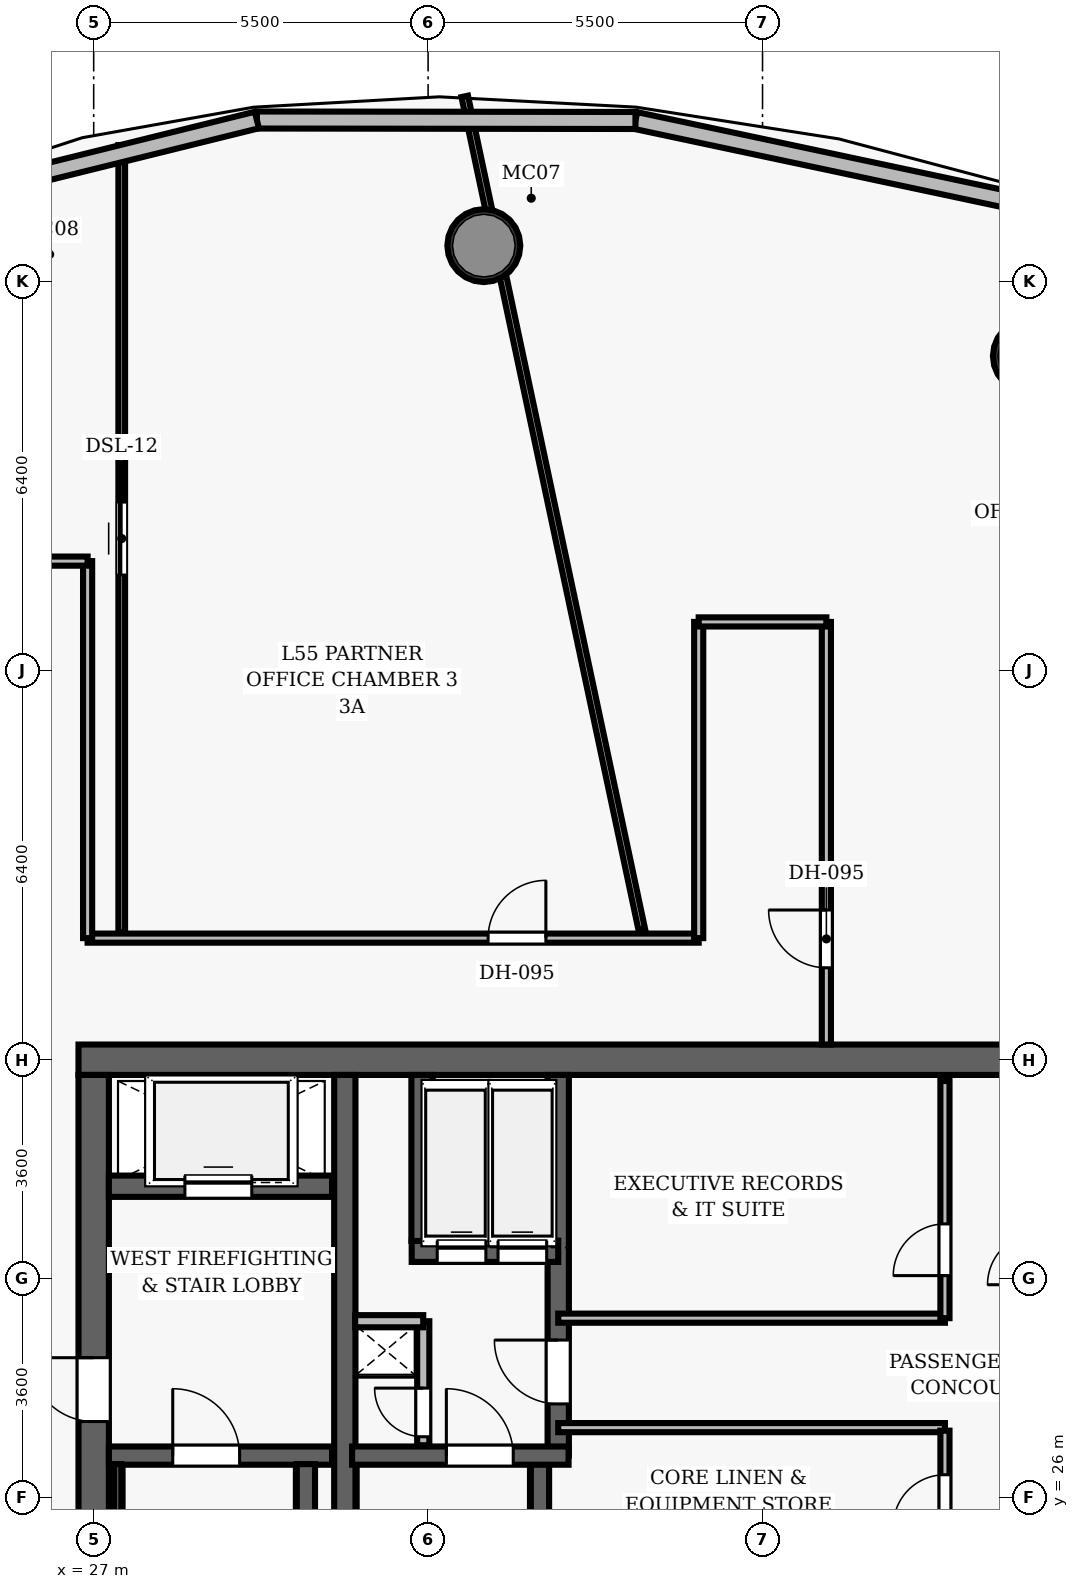
"""IFC4 building model, lengths in metres.
Left out: names, types, materials, properties, quantities, classifications, styles, units other than length and angle.
Written with IfcOpenShell. Run it as: python <this file> out.ifc"""

import sys

from ifc_helpers import new_model, si_unit, direction, frame, frame_2d, origin, origin_2d, place, context, subcontext, project, spatial, rectangle, hollow_circle, extrude, element, fill, save


model = new_model("IFC4")
c1 = context("Model", 3, precision=1e-05, world=origin(), true_north=direction((0.0, 1.0)))
c2 = subcontext(c1, "Body", "Model", "MODEL_VIEW")
j1 = project(units=[si_unit("LENGTHUNIT", "METRE"), si_unit("PLANEANGLEUNIT", "RADIAN")], contexts=[c1])
p1 = place(None, origin())
s1 = spatial("IfcSite", under=j1, at=p1, CompositionType="ELEMENT")
p2 = place(p1, origin())
s2 = spatial("IfcBuilding", under=s1, at=p2, CompositionType="ELEMENT")
p3 = place(p2, frame((0.0, 0.0, 217.4)))
s3 = spatial("IfcBuildingStorey", under=s2, at=p3, CompositionType="ELEMENT", Elevation=217.4)
p4 = place(p3, frame((26.75, 33.2, 0.0), z_axis=(0.0, 0.0, 1.0), x_axis=(1.0, 0.0, 0.0)))
e1 = element("IfcWall", 1, at=p4, inside=s3, PredefinedType="SHEAR", context=c2, shape_type="SweptSolid", body=[
    extrude(rectangle(XDim=22.5, YDim=0.5, at=frame_2d((11.25, 0.0))), origin(), (0.0, 0.0, 1.0), 3.85),
])
p5 = place(p3, frame((27.0, 19.05, 0.0), z_axis=(0.0, 0.0, 1.0), x_axis=(0.0, 1.0, 0.0)))
e2 = element("IfcWall", 2, at=p5, inside=s3, PredefinedType="SHEAR", context=c2, shape_type="SweptSolid", body=[
    extrude(rectangle(XDim=13.9, YDim=0.5, at=frame_2d((6.95, 0.0))), origin(), (0.0, 0.0, 1.0), 3.85),
])
p6 = place(p5, frame((8.2, 0.0, 0.0)))
e3 = element("IfcOpeningElement", 3, at=p6, cuts=e2, PredefinedType="OPENING", context=c2, shape_type="SweptSolid", body=[
    extrude(rectangle(XDim=1.05, YDim=2.15, at=frame_2d((0.525, 1.075))), frame((0.0, 0.26, 0.0), z_axis=(0.0, -1.0, 0.0), x_axis=(1.0, 0.0, 0.0)), (0.0, 0.0, 1.0), 0.52),
])
p7 = place(p3, frame((31.13, 19.05, 0.0), z_axis=(0.0, 0.0, 1.0), x_axis=(0.0, 1.0, 0.0)))
e4 = element("IfcWall", 4, at=p7, inside=s3, PredefinedType="SHEAR", context=c2, shape_type="SweptSolid", body=[
    extrude(rectangle(XDim=13.9, YDim=0.35, at=frame_2d((6.95, 0.0))), origin(), (0.0, 0.0, 1.0), 3.85),
])
for number, where, z_axis, x_axis in (
    (5, (42.389, 44.772, 0.0), (0.0, 0.0, 1.0), (1.0, 0.0, 0.0)),
    (6, (33.416, 46.588, 0.0), (0.0, 0.0, 1.0), (1.0, 0.0, 0.0)),
):
    element("IfcColumn", number, at=place(p3, frame(where, z_axis=z_axis, x_axis=x_axis)), inside=s3, PredefinedType="COLUMN", context=c2, shape_type="SweptSolid", body=[
        extrude(hollow_circle(Radius=0.6, WallThickness=0.05, at=origin_2d()), origin(), (0.0, 0.0, 1.0), 3.85),
    ])
p8 = place(p3, frame((27.25, 26.69, 0.0), z_axis=(0.0, 0.0, 1.0), x_axis=(1.0, 0.0, 0.0)))
e7 = element("IfcWall", 7, at=p8, inside=s3, PredefinedType="SHEAR", context=c2, shape_type="SweptSolid", body=[
    extrude(rectangle(XDim=3.67, YDim=0.3, at=frame_2d((1.835, 0.0))), origin(), (0.0, 0.0, 1.0), 3.85),
])
p9 = place(p8, frame((1.05, 0.0, 0.0)))
e8 = element("IfcOpeningElement", 8, at=p9, cuts=e7, PredefinedType="OPENING", context=c2, shape_type="SweptSolid", body=[
    extrude(rectangle(XDim=1.1, YDim=2.15, at=frame_2d((0.55, 1.075))), frame((0.0, 0.16, 0.0), z_axis=(0.0, -1.0, 0.0), x_axis=(1.0, 0.0, 0.0)), (0.0, 0.0, 1.0), 0.32),
])
p10 = place(p3, frame((30.49, 19.05, 0.0), z_axis=(0.0, 0.0, 1.0), x_axis=(0.0, 1.0, 0.0)))
e9 = element("IfcWall", 9, at=p10, inside=s3, PredefinedType="SHEAR", context=c2, shape_type="SweptSolid", body=[
    extrude(rectangle(XDim=7.5, YDim=0.3, at=frame_2d((3.75, 0.0))), origin(), (0.0, 0.0, 1.0), 3.85),
])
p11 = place(p3, frame((27.395, 19.1, 0.0), z_axis=(0.0, 0.0, 1.0), x_axis=(0.0, 1.0, 0.0)))
e10 = element("IfcWall", 10, at=p11, inside=s3, PredefinedType="SHEAR", context=c2, shape_type="SweptSolid", body=[
    extrude(rectangle(XDim=7.45, YDim=0.12, at=frame_2d((3.725, 0.0))), origin(), (0.0, 0.0, 1.0), 3.85),
])
p12 = place(p3, frame((27.25, 31.12, 0.0), z_axis=(0.0, 0.0, 1.0), x_axis=(1.0, 0.0, 0.0)))
e11 = element("IfcWall", 11, at=p12, inside=s3, PredefinedType="SHEAR", context=c2, shape_type="SweptSolid", body=[
    extrude(rectangle(XDim=3.67, YDim=0.35, at=frame_2d((1.835, 0.0))), origin(), (0.0, 0.0, 1.0), 3.035),
])
p13 = place(p12, frame((1.25, 0.0, 0.0)))
e12 = element("IfcOpeningElement", 12, at=p13, cuts=e11, PredefinedType="OPENING", context=c2, shape_type="SweptSolid", body=[
    extrude(rectangle(XDim=1.1, YDim=2.15, at=frame_2d((0.55, 1.075))), frame((0.0, 0.185, 0.0), z_axis=(0.0, -1.0, 0.0), x_axis=(1.0, 0.0, 0.0)), (0.0, 0.0, 1.0), 0.37),
])
p14 = place(p3, frame((34.34, 19.05, 0.0), z_axis=(0.0, 0.0, 1.0), x_axis=(0.0, 1.0, 0.0)))
e13 = element("IfcWall", 13, at=p14, inside=s3, PredefinedType="SHEAR", context=c2, shape_type="SweptSolid", body=[
    extrude(rectangle(XDim=7.5, YDim=0.3, at=frame_2d((3.75, 0.0))), origin(), (0.0, 0.0, 1.0), 3.85),
])
p15 = place(p3, frame((34.64, 26.69, 0.0), z_axis=(0.0, 0.0, 1.0), x_axis=(0.0, 1.0, 0.0)))
e14 = element("IfcWall", 14, at=p15, inside=s3, PredefinedType="SHEAR", context=c2, shape_type="SweptSolid", body=[
    extrude(rectangle(XDim=6.26, YDim=0.35, at=frame_2d((3.13, 0.0))), origin(), (0.0, 0.0, 1.0), 3.85),
])
p16 = place(p15, frame((0.85, 0.0, 0.0)))
e15 = element("IfcOpeningElement", 15, at=p16, cuts=e14, PredefinedType="OPENING", context=c2, shape_type="SweptSolid", body=[
    extrude(rectangle(XDim=1.05, YDim=2.15, at=frame_2d((0.525, 1.075))), frame((0.0, 0.185, 0.0), z_axis=(0.0, -1.0, 0.0), x_axis=(1.0, 0.0, 0.0)), (0.0, 0.0, 1.0), 0.37),
])
p17 = place(p3, frame((31.25, 26.69, 0.0), z_axis=(0.0, 0.0, 1.0), x_axis=(1.0, 0.0, 0.0)))
e16 = element("IfcWall", 16, at=p17, inside=s3, PredefinedType="SHEAR", context=c2, shape_type="SweptSolid", body=[
    extrude(rectangle(XDim=3.56, YDim=0.3, at=frame_2d((1.78, 0.0))), origin(), (0.0, 0.0, 1.0), 3.85),
])
p18 = place(p17, frame((1.55, 0.0, 0.0)))
e17 = element("IfcOpeningElement", 17, at=p18, cuts=e16, PredefinedType="OPENING", context=c2, shape_type="SweptSolid", body=[
    extrude(rectangle(XDim=1.1, YDim=2.15, at=frame_2d((0.55, 1.075))), frame((0.0, 0.16, 0.0), z_axis=(0.0, -1.0, 0.0), x_axis=(1.0, 0.0, 0.0)), (0.0, 0.0, 1.0), 0.32),
])
p19 = place(p3, frame((32.23, 30.05, 0.0), z_axis=(0.0, 0.0, 1.0), x_axis=(1.0, 0.0, 0.0)))
e18 = element("IfcWall", 18, at=p19, inside=s3, PredefinedType="SHEAR", context=c2, shape_type="SweptSolid", body=[
    extrude(rectangle(XDim=2.41, YDim=0.35, at=frame_2d((1.205, 0.0))), origin(), (0.0, 0.0, 1.0), 3.035),
])
p20 = place(p19, frame((0.42, 0.0, 0.0)))
e19 = element("IfcOpeningElement", 19, at=p20, cuts=e18, PredefinedType="OPENING", context=c2, shape_type="SweptSolid", body=[
    extrude(rectangle(XDim=0.8, YDim=2.15, at=frame_2d((0.4, 1.075))), frame((0.0, 0.185, 0.0), z_axis=(0.0, -1.0, 0.0), x_axis=(1.0, 0.0, 0.0)), (0.0, 0.0, 1.0), 0.37),
])
p21 = place(p19, frame((1.42, 0.0, 0.0)))
e20 = element("IfcOpeningElement", 20, at=p21, cuts=e18, PredefinedType="OPENING", context=c2, shape_type="SweptSolid", body=[
    extrude(rectangle(XDim=0.8, YDim=2.15, at=frame_2d((0.4, 1.075))), frame((0.0, 0.185, 0.0), z_axis=(0.0, -1.0, 0.0), x_axis=(1.0, 0.0, 0.0)), (0.0, 0.0, 1.0), 0.37),
])
p22 = place(p3, frame((32.4, 30.22, 0.0), z_axis=(0.0, 0.0, 1.0), x_axis=(0.0, 1.0, 0.0)))
e21 = element("IfcWall", 21, at=p22, inside=s3, PredefinedType="SHEAR", context=c2, shape_type="SweptSolid", body=[
    extrude(rectangle(XDim=2.73, YDim=0.35, at=frame_2d((1.365, 0.0))), origin(), (0.0, 0.0, 1.0), 3.035),
])
p23 = place(p3, frame((32.42, 26.86, 0.0), z_axis=(0.0, 0.0, 1.0), x_axis=(0.0, 1.0, 0.0)))
e22 = element("IfcWall", 22, at=p23, inside=s3, PredefinedType="PARTITIONING", context=c2, shape_type="SweptSolid", body=[
    extrude(rectangle(XDim=2.04, YDim=0.2, at=frame_2d((1.02, 0.0))), origin(), (0.0, 0.0, 1.0), 3.035),
])
p24 = place(p23, frame((0.14, 0.0, 0.0)))
e23 = element("IfcOpeningElement", 23, at=p24, cuts=e22, PredefinedType="OPENING", context=c2, shape_type="SweptSolid", body=[
    extrude(rectangle(XDim=0.8, YDim=2.05, at=frame_2d((0.4, 1.025))), frame((0.0, 0.11, 0.0), z_axis=(0.0, -1.0, 0.0), x_axis=(1.0, 0.0, 0.0)), (0.0, 0.0, 1.0), 0.22),
])
p25 = place(p3, frame((31.3, 28.9, 0.0), z_axis=(0.0, 0.0, 1.0), x_axis=(1.0, 0.0, 0.0)))
e24 = element("IfcWall", 24, at=p25, inside=s3, PredefinedType="PARTITIONING", context=c2, shape_type="SweptSolid", body=[
    extrude(rectangle(XDim=1.12, YDim=0.2, at=frame_2d((0.56, 0.0))), origin(), (0.0, 0.0, 1.0), 3.035),
])
for number, where, z_axis, x_axis in (
    (25, (34.64, 27.15, 0.0), (0.0, 0.0, 1.0), (1.0, 0.0, 0.0)),
    (26, (34.64, 28.95, 0.0), (0.0, 0.0, 1.0), (1.0, 0.0, 0.0)),
):
    element("IfcWall", number, at=place(p3, frame(where, z_axis=z_axis, x_axis=x_axis)), inside=s3, PredefinedType="PARTITIONING", context=c2, shape_type="SweptSolid", body=[
        extrude(rectangle(XDim=6.36, YDim=0.15, at=frame_2d((3.18, 0.0))), origin(), (0.0, 0.0, 1.0), 3.035),
    ])
p26 = place(p3, frame((41.0, 28.95, 0.0), z_axis=(0.0, 0.0, 1.0), x_axis=(0.0, 1.0, 0.0)))
e27 = element("IfcWall", 27, at=p26, inside=s3, PredefinedType="PARTITIONING", context=c2, shape_type="SweptSolid", body=[
    extrude(rectangle(XDim=3.9, YDim=0.15, at=frame_2d((1.95, 0.0))), origin(), (0.0, 0.0, 1.0), 3.035),
])
p27 = place(p26, frame((0.7, 0.0, 0.0)))
e28 = element("IfcOpeningElement", 28, at=p27, cuts=e27, PredefinedType="OPENING", context=c2, shape_type="SweptSolid", body=[
    extrude(rectangle(XDim=0.85, YDim=2.1, at=frame_2d((0.425, 1.05))), frame((0.0, 0.085, 0.0), z_axis=(0.0, -1.0, 0.0), x_axis=(1.0, 0.0, 0.0)), (0.0, 0.0, 1.0), 0.17),
])
p28 = place(p3, frame((41.0, 23.05, 0.0), z_axis=(0.0, 0.0, 1.0), x_axis=(0.0, 1.0, 0.0)))
e29 = element("IfcWall", 29, at=p28, inside=s3, PredefinedType="PARTITIONING", context=c2, shape_type="SweptSolid", body=[
    extrude(rectangle(XDim=4.05, YDim=0.15, at=frame_2d((2.025, 0.0))), origin(), (0.0, 0.0, 1.0), 3.035),
])
p29 = place(p28, frame((2.475, 0.0, 0.0)))
e30 = element("IfcOpeningElement", 30, at=p29, cuts=e29, PredefinedType="OPENING", context=c2, shape_type="SweptSolid", body=[
    extrude(rectangle(XDim=0.85, YDim=2.1, at=frame_2d((0.425, 1.05))), frame((0.0, 0.085, 0.0), z_axis=(0.0, -1.0, 0.0), x_axis=(1.0, 0.0, 0.0)), (0.0, 0.0, 1.0), 0.17),
])
p30 = place(p28, frame((0.45, 0.0, 0.0)))
e31 = element("IfcOpeningElement", 31, at=p30, cuts=e29, PredefinedType="OPENING", context=c2, shape_type="SweptSolid", body=[
    extrude(rectangle(XDim=0.85, YDim=2.1, at=frame_2d((0.425, 1.05))), frame((0.0, 0.085, 0.0), z_axis=(0.0, -1.0, 0.0), x_axis=(1.0, 0.0, 0.0)), (0.0, 0.0, 1.0), 0.17),
])
p31 = place(p3, frame((26.9, 35.2, 0.0), z_axis=(0.0, 0.0, 1.0), x_axis=(1.0, 0.0, 0.0)))
e32 = element("IfcWall", 32, at=p31, inside=s3, PredefinedType="PARTITIONING", context=c2, shape_type="SweptSolid", body=[
    extrude(rectangle(XDim=10.05, YDim=0.15, at=frame_2d((5.025, 0.0))), origin(), (0.0, 0.0, 1.0), 3.035),
])
p32 = place(p31, frame((6.587, 0.0, 0.0)))
e33 = element("IfcOpeningElement", 33, at=p32, cuts=e32, PredefinedType="OPENING", context=c2, shape_type="SweptSolid", body=[
    extrude(rectangle(XDim=0.95, YDim=2.15, at=frame_2d((0.475, 1.075))), frame((0.0, 0.085, 0.0), z_axis=(0.0, -1.0, 0.0), x_axis=(1.0, 0.0, 0.0)), (0.0, 0.0, 1.0), 0.17),
])
p33 = place(p3, frame((26.9, 35.2, 0.0), z_axis=(0.0, 0.0, 1.0), x_axis=(0.0, 1.0, 0.0)))
e34 = element("IfcWall", 34, at=p33, inside=s3, PredefinedType="PARTITIONING", context=c2, shape_type="SweptSolid", body=[
    extrude(rectangle(XDim=6.2, YDim=0.15, at=frame_2d((3.1, 0.0))), origin(), (0.0, 0.0, 1.0), 3.035),
])
p34 = place(p3, frame((24.8, 41.4, 0.0), z_axis=(0.0, 0.0, 1.0), x_axis=(1.0, 0.0, 0.0)))
e35 = element("IfcWall", 35, at=p34, inside=s3, PredefinedType="PARTITIONING", context=c2, shape_type="SweptSolid", body=[
    extrude(rectangle(XDim=2.1, YDim=0.15, at=frame_2d((1.05, 0.0))), origin(), (0.0, 0.0, 1.0), 3.035),
])
p35 = place(p3, frame((36.95, 35.2, 0.0), z_axis=(0.0, 0.0, 1.0), x_axis=(0.0, 1.0, 0.0)))
e36 = element("IfcWall", 36, at=p35, inside=s3, PredefinedType="PARTITIONING", context=c2, shape_type="SweptSolid", body=[
    extrude(rectangle(XDim=5.2, YDim=0.15, at=frame_2d((2.6, 0.0))), origin(), (0.0, 0.0, 1.0), 3.035),
])
p36 = place(p3, frame((39.05, 33.45, 0.0), z_axis=(0.0, 0.0, 1.0), x_axis=(0.0, 1.0, 0.0)))
e37 = element("IfcWall", 37, at=p36, inside=s3, PredefinedType="PARTITIONING", context=c2, shape_type="SweptSolid", body=[
    extrude(rectangle(XDim=6.95, YDim=0.15, at=frame_2d((3.475, 0.0))), origin(), (0.0, 0.0, 1.0), 3.035),
])
p37 = place(p36, frame((1.262, 0.0, 0.0)))
e38 = element("IfcOpeningElement", 38, at=p37, cuts=e37, PredefinedType="OPENING", context=c2, shape_type="SweptSolid", body=[
    extrude(rectangle(XDim=0.95, YDim=2.15, at=frame_2d((0.475, 1.075))), frame((0.0, 0.085, 0.0), z_axis=(0.0, -1.0, 0.0), x_axis=(1.0, 0.0, 0.0)), (0.0, 0.0, 1.0), 0.17),
])
p38 = place(p3, frame((36.95, 40.4, 0.0), z_axis=(0.0, 0.0, 1.0), x_axis=(1.0, 0.0, 0.0)))
e39 = element("IfcWall", 39, at=p38, inside=s3, PredefinedType="PARTITIONING", context=c2, shape_type="SweptSolid", body=[
    extrude(rectangle(XDim=2.1, YDim=0.15, at=frame_2d((1.05, 0.0))), origin(), (0.0, 0.0, 1.0), 3.035),
])
p39 = place(p3, frame((36.015, 35.34, 0.0), z_axis=(0.0, 0.0, 1.0), x_axis=(-0.207905443256, 0.978148928673, 0.0)))
e40 = element("IfcWall", 40, at=p39, inside=s3, PredefinedType="PARTITIONING", context=c2, shape_type="SweptSolid", body=[
    extrude(rectangle(XDim=14.009, YDim=0.11, at=frame_2d((7.005, 0.0))), origin(), (0.0, 0.0, 1.0), 3.035),
])
p40 = place(p3, frame((27.461, 35.3, 0.0), z_axis=(0.0, 0.0, 1.0), x_axis=(0.0, 1.0, 0.0)))
e41 = element("IfcWall", 41, at=p40, inside=s3, PredefinedType="PARTITIONING", context=c2, shape_type="SweptSolid", body=[
    extrude(rectangle(XDim=12.942, YDim=0.11, at=frame_2d((6.471, 0.0))), origin(), (0.0, 0.0, 1.0), 3.035),
])
p41 = place(p40, frame((5.871, 0.0, 0.0)))
e42 = element("IfcOpeningElement", 42, at=p41, cuts=e41, PredefinedType="OPENING", context=c2, shape_type="SweptSolid", body=[
    extrude(rectangle(XDim=1.2, YDim=2.15, at=frame_2d((0.6, 1.075))), frame((0.0, 0.065, 0.0), z_axis=(0.0, -1.0, 0.0), x_axis=(1.0, 0.0, 0.0)), (0.0, 0.0, 1.0), 0.13),
])
p42 = place(p3, frame((35.91, 48.646, 0.0), z_axis=(0.0, 0.0, 1.0), x_axis=(0.978160131295, -0.207852730423, 0.0)))
e43 = element("IfcWall", 43, at=p42, inside=s3, PredefinedType="SOLIDWALL", context=c2, shape_type="SweptSolid", body=[
    extrude(rectangle(XDim=6.784, YDim=0.28, at=frame_2d((3.392, 0.0))), origin(), (0.0, 0.0, 1.0), 3.62),
])
p43 = place(p3, frame((29.684, 48.654, 0.0), z_axis=(0.0, 0.0, 1.0), x_axis=(0.999999212858, -0.001254704157, 0.0)))
e44 = element("IfcWall", 44, at=p43, inside=s3, PredefinedType="SOLIDWALL", context=c2, shape_type="SweptSolid", body=[
    extrude(rectangle(XDim=6.227, YDim=0.28, at=frame_2d((3.113, 0.0))), origin(), (0.0, 0.0, 1.0), 3.62),
])
p44 = place(p3, frame((24.379, 47.342, 0.0), z_axis=(0.0, 0.0, 1.0), x_axis=(0.970725742069, 0.240190619476, 0.0)))
e45 = element("IfcWall", 45, at=p44, inside=s3, PredefinedType="SOLIDWALL", context=c2, shape_type="SweptSolid", body=[
    extrude(rectangle(XDim=5.464, YDim=0.28, at=frame_2d((2.732, 0.0))), origin(), (0.0, 0.0, 1.0), 3.62),
])
p45 = place(p9, origin())
e46 = element("IfcDoor", 46, at=p45, inside=s3, OperationType="SINGLE_SWING_LEFT", PredefinedType="DOOR", context=c2, shape_type="SweptSolid", body=[
    extrude(rectangle(XDim=1.1, YDim=2.15, at=frame_2d((0.55, 1.075))), frame((0.0, 0.025, 0.0), z_axis=(0.0, -1.0, 0.0), x_axis=(1.0, 0.0, 0.0)), (0.0, 0.0, 1.0), 0.05),
])
fill(e8, e46)
p46 = place(p6, origin())
e47 = element("IfcDoor", 47, at=p46, inside=s3, OperationType="SINGLE_SWING_RIGHT", PredefinedType="DOOR", context=c2, shape_type="SweptSolid", body=[
    extrude(rectangle(XDim=1.05, YDim=2.15, at=frame_2d((0.525, 1.075))), frame((0.0, 0.025, 0.0), z_axis=(0.0, -1.0, 0.0), x_axis=(1.0, 0.0, 0.0)), (0.0, 0.0, 1.0), 0.05),
])
fill(e3, e47)
p47 = place(p18, origin())
e48 = element("IfcDoor", 48, at=p47, inside=s3, OperationType="SINGLE_SWING_LEFT", PredefinedType="DOOR", context=c2, shape_type="SweptSolid", body=[
    extrude(rectangle(XDim=1.1, YDim=2.15, at=frame_2d((0.55, 1.075))), frame((0.0, 0.025, 0.0), z_axis=(0.0, -1.0, 0.0), x_axis=(1.0, 0.0, 0.0)), (0.0, 0.0, 1.0), 0.05),
])
fill(e17, e48)
p48 = place(p24, origin())
e49 = element("IfcDoor", 49, at=p48, inside=s3, OperationType="SINGLE_SWING_RIGHT", PredefinedType="DOOR", context=c2, shape_type="SweptSolid", body=[
    extrude(rectangle(XDim=0.8, YDim=2.05, at=frame_2d((0.4, 1.025))), frame((0.0, 0.025, 0.0), z_axis=(0.0, -1.0, 0.0), x_axis=(1.0, 0.0, 0.0)), (0.0, 0.0, 1.0), 0.05),
])
fill(e23, e49)
p49 = place(p16, origin())
e50 = element("IfcDoor", 50, at=p49, inside=s3, OperationType="SINGLE_SWING_RIGHT", PredefinedType="DOOR", context=c2, shape_type="SweptSolid", body=[
    extrude(rectangle(XDim=1.05, YDim=2.15, at=frame_2d((0.525, 1.075))), frame((0.0, 0.025, 0.0), z_axis=(0.0, -1.0, 0.0), x_axis=(1.0, 0.0, 0.0)), (0.0, 0.0, 1.0), 0.05),
])
fill(e15, e50)
p50 = place(p27, origin())
e51 = element("IfcDoor", 51, at=p50, inside=s3, OperationType="SINGLE_SWING_LEFT", PredefinedType="DOOR", context=c2, shape_type="SweptSolid", body=[
    extrude(rectangle(XDim=0.85, YDim=2.1, at=frame_2d((0.425, 1.05))), frame((0.0, 0.025, 0.0), z_axis=(0.0, -1.0, 0.0), x_axis=(1.0, 0.0, 0.0)), (0.0, 0.0, 1.0), 0.05),
])
fill(e28, e51)
p51 = place(p29, origin())
e52 = element("IfcDoor", 52, at=p51, inside=s3, OperationType="SINGLE_SWING_LEFT", PredefinedType="DOOR", context=c2, shape_type="SweptSolid", body=[
    extrude(rectangle(XDim=0.85, YDim=2.1, at=frame_2d((0.425, 1.05))), frame((0.0, 0.025, 0.0), z_axis=(0.0, -1.0, 0.0), x_axis=(1.0, 0.0, 0.0)), (0.0, 0.0, 1.0), 0.05),
])
fill(e30, e52)
p52 = place(p37, origin())
e53 = element("IfcDoor", 53, at=p52, inside=s3, OperationType="SINGLE_SWING_RIGHT", PredefinedType="DOOR", context=c2, shape_type="SweptSolid", body=[
    extrude(rectangle(XDim=0.95, YDim=2.15, at=frame_2d((0.475, 1.075))), frame((0.0, 0.025, 0.0), z_axis=(0.0, -1.0, 0.0), x_axis=(1.0, 0.0, 0.0)), (0.0, 0.0, 1.0), 0.05),
])
fill(e38, e53)
p53 = place(p32, origin())
e54 = element("IfcDoor", 54, at=p53, inside=s3, OperationType="SINGLE_SWING_RIGHT", PredefinedType="DOOR", context=c2, shape_type="SweptSolid", body=[
    extrude(rectangle(XDim=0.95, YDim=2.15, at=frame_2d((0.475, 1.075))), frame((0.0, 0.025, 0.0), z_axis=(0.0, -1.0, 0.0), x_axis=(1.0, 0.0, 0.0)), (0.0, 0.0, 1.0), 0.05),
])
fill(e33, e54)
p54 = place(p41, origin())
e55 = element("IfcDoor", 55, at=p54, inside=s3, OperationType="SLIDING_TO_RIGHT", PredefinedType="DOOR", context=c2, shape_type="SweptSolid", body=[
    extrude(rectangle(XDim=1.2, YDim=2.15, at=frame_2d((0.6, 1.075))), frame((0.0, 0.025, 0.0), z_axis=(0.0, -1.0, 0.0), x_axis=(1.0, 0.0, 0.0)), (0.0, 0.0, 1.0), 0.05),
])
fill(e42, e55)
p55 = place(p13, origin())
e56 = element("IfcDoor", 56, at=p55, inside=s3, OperationType="SLIDING_TO_LEFT", PredefinedType="DOOR", context=c2, shape_type="SweptSolid", body=[
    extrude(rectangle(XDim=1.1, YDim=2.15, at=frame_2d((0.55, 1.075))), frame((0.0, 0.025, 0.0), z_axis=(0.0, -1.0, 0.0), x_axis=(1.0, 0.0, 0.0)), (0.0, 0.0, 1.0), 0.05),
])
fill(e12, e56)
p56 = place(p20, origin())
e57 = element("IfcDoor", 57, at=p56, inside=s3, OperationType="SLIDING_TO_LEFT", PredefinedType="DOOR", context=c2, shape_type="SweptSolid", body=[
    extrude(rectangle(XDim=0.8, YDim=2.15, at=frame_2d((0.4, 1.075))), frame((0.0, 0.025, 0.0), z_axis=(0.0, -1.0, 0.0), x_axis=(1.0, 0.0, 0.0)), (0.0, 0.0, 1.0), 0.05),
])
fill(e19, e57)
p57 = place(p21, origin())
e58 = element("IfcDoor", 58, at=p57, inside=s3, OperationType="SLIDING_TO_LEFT", PredefinedType="DOOR", context=c2, shape_type="SweptSolid", body=[
    extrude(rectangle(XDim=0.8, YDim=2.15, at=frame_2d((0.4, 1.075))), frame((0.0, 0.025, 0.0), z_axis=(0.0, -1.0, 0.0), x_axis=(1.0, 0.0, 0.0)), (0.0, 0.0, 1.0), 0.05),
])
fill(e20, e58)
save(model, sys.argv[1])
